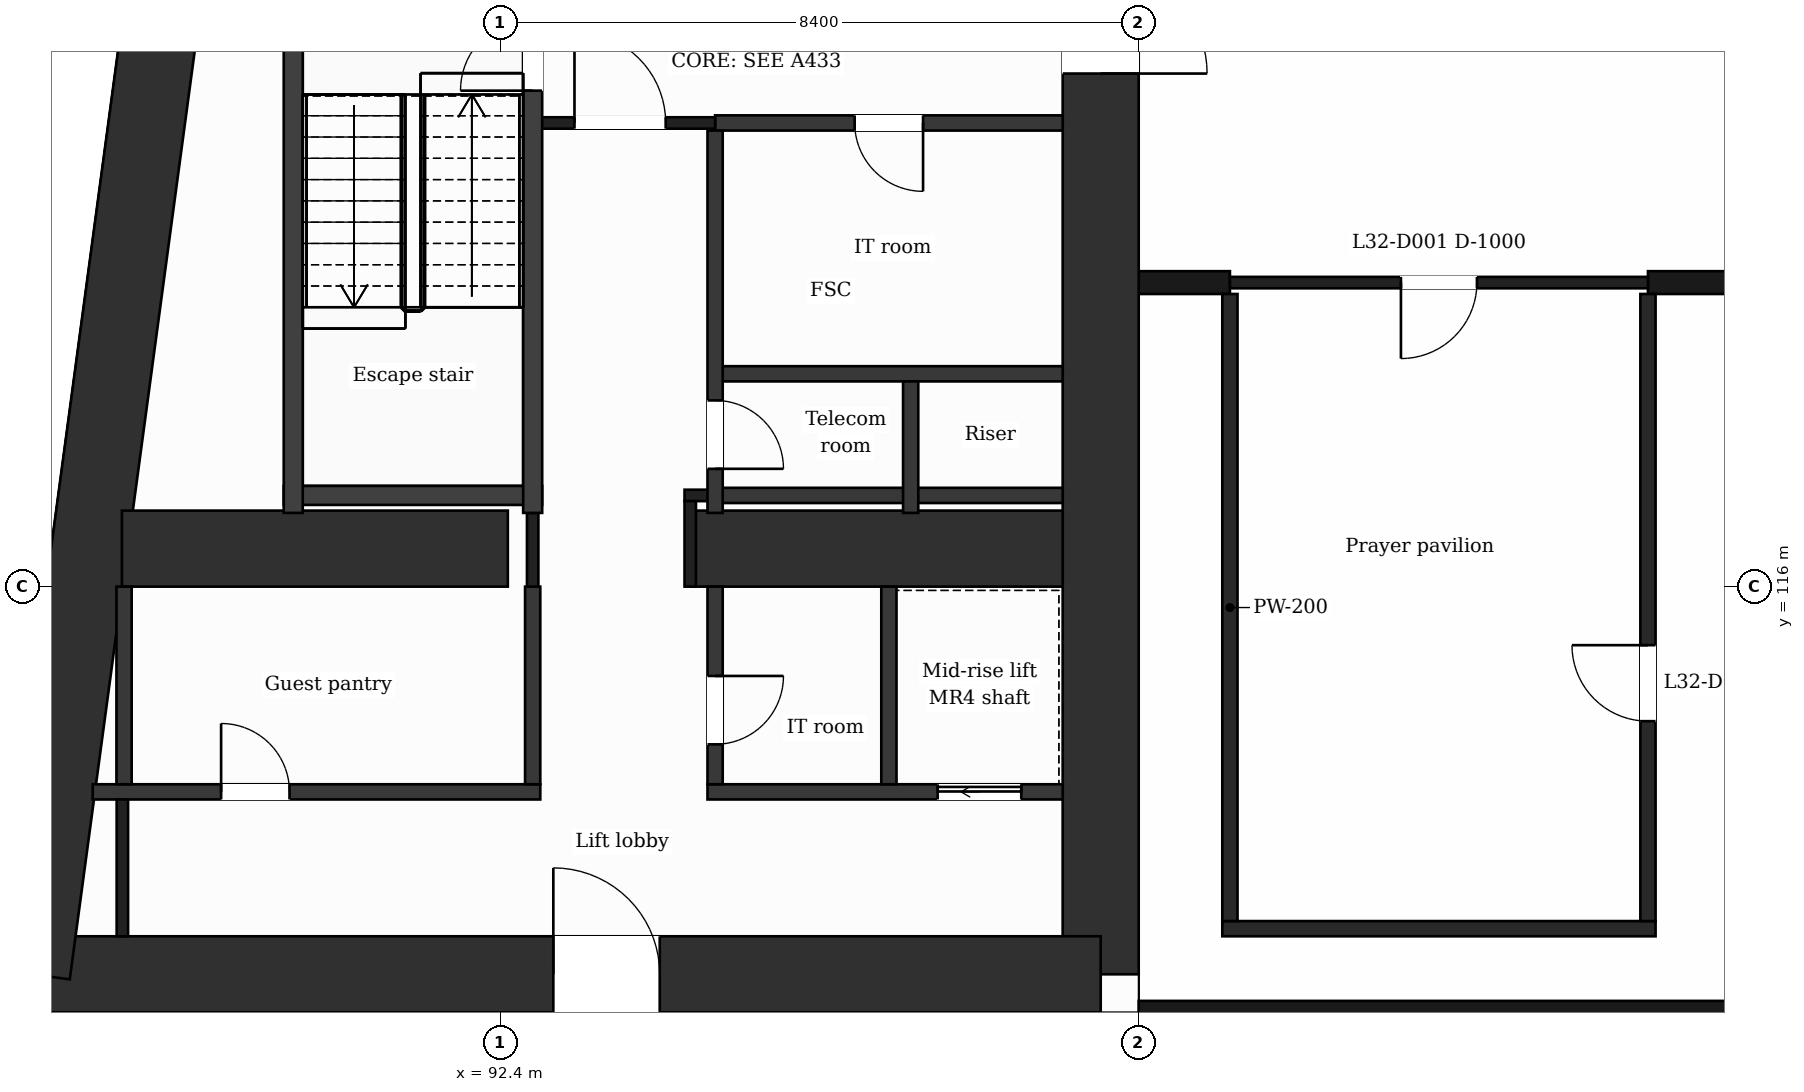
"""IFC4 building model, lengths in metres.
Left out: names, types, materials, properties, quantities, classifications, styles, units other than length and angle.
Written with IfcOpenShell. Run it as: python <this file> out.ifc"""

import sys

from ifc_helpers import new_model, si_unit, direction, frame, frame_2d, origin, place, context, subcontext, project, spatial, rectangle, extrude, element, fill, save


model = new_model("IFC4")
c1 = context("Model", 3, precision=1e-05, world=origin(), true_north=direction((0.0, 1.0)))
c2 = subcontext(c1, "Body", "Model", "MODEL_VIEW")
j1 = project(units=[si_unit("LENGTHUNIT", "METRE"), si_unit("PLANEANGLEUNIT", "RADIAN")], contexts=[c1])
p1 = place(None, origin())
s1 = spatial("IfcSite", under=j1, at=p1, CompositionType="ELEMENT")
p2 = place(p1, origin())
s2 = spatial("IfcBuilding", under=s1, at=p2, CompositionType="ELEMENT")
p3 = place(p2, frame((0.0, 0.0, 135.4)))
s3 = spatial("IfcBuildingStorey", under=s2, at=p3, CompositionType="ELEMENT", Elevation=135.4)
p4 = place(p3, frame((100.3, 131.9, 0.0), z_axis=(0.0, 0.0, 1.0), x_axis=(0.0, -1.0, 0.0)))
e1 = element("IfcWall", 1, at=p4, inside=s3, PredefinedType="SHEAR", context=c2, shape_type="SweptSolid", body=[
    extrude(rectangle(XDim=21.0, YDim=1.0, at=frame_2d((10.5, 0.0))), origin(), (0.0, 0.0, 1.0), 7.4),
])
p5 = place(p4, frame((7.75, 0.0, 0.0)))
e2 = element("IfcOpeningElement", 2, at=p5, cuts=e1, PredefinedType="OPENING", context=c2, shape_type="SweptSolid", body=[
    extrude(rectangle(XDim=1.4, YDim=2.1, at=frame_2d((0.7, 1.05))), frame((0.0, 0.51, 0.0), z_axis=(0.0, -1.0, 0.0), x_axis=(1.0, 0.0, 0.0)), (0.0, 0.0, 1.0), 1.02),
])
p6 = place(p3, frame((100.3, 110.9, 0.0), z_axis=(0.0, 0.0, 1.0), x_axis=(-1.0, 0.0, 0.0)))
e3 = element("IfcWall", 3, at=p6, inside=s3, PredefinedType="SHEAR", context=c2, shape_type="SweptSolid", body=[
    extrude(rectangle(XDim=14.059, YDim=1.0, at=frame_2d((7.03, 0.0))), origin(), (0.0, 0.0, 1.0), 7.4),
])
p7 = place(p6, frame((5.802, 0.0, 0.0)))
e4 = element("IfcOpeningElement", 4, at=p7, cuts=e3, PredefinedType="OPENING", context=c2, shape_type="SweptSolid", body=[
    extrude(rectangle(XDim=1.4, YDim=2.1, at=frame_2d((0.7, 1.05))), frame((0.0, 0.51, 0.0), z_axis=(0.0, -1.0, 0.0), x_axis=(1.0, 0.0, 0.0)), (0.0, 0.0, 1.0), 1.02),
])
p8 = place(p3, frame((86.241, 110.9, 0.0), z_axis=(0.0, 0.0, 1.0), x_axis=(0.133411141623, 0.991060778808, 0.0)))
e5 = element("IfcWall", 5, at=p8, inside=s3, PredefinedType="SHEAR", context=c2, shape_type="SweptSolid", body=[
    extrude(rectangle(XDim=21.189, YDim=1.0, at=frame_2d((10.595, 0.0))), origin(), (0.0, 0.0, 1.0), 7.4),
])
p9 = place(p3, frame((87.423, 116.5, 0.0), z_axis=(0.0, 0.0, 1.0), x_axis=(1.0, 0.0, 0.0)))
e6 = element("IfcWall", 6, at=p9, inside=s3, PredefinedType="SHEAR", context=c2, shape_type="SweptSolid", body=[
    extrude(rectangle(XDim=5.077, YDim=1.0, at=frame_2d((2.539, 0.0))), origin(), (0.0, 0.0, 1.0), 7.4),
])
p10 = place(p3, frame((94.9, 116.5, 0.0), z_axis=(0.0, 0.0, 1.0), x_axis=(1.0, 0.0, 0.0)))
e7 = element("IfcWall", 7, at=p10, inside=s3, PredefinedType="SHEAR", context=c2, shape_type="SweptSolid", body=[
    extrude(rectangle(XDim=4.9, YDim=1.0, at=frame_2d((2.45, 0.0))), origin(), (0.0, 0.0, 1.0), 7.4),
])
p11 = place(p3, frame((100.8, 110.4, 0.0), z_axis=(0.0, 0.0, 1.0), x_axis=(1.0, 0.0, 0.0)))
e8 = element("IfcWall", 8, at=p11, inside=s3, PredefinedType="PARTITIONING", context=c2, shape_type="SweptSolid", body=[
    extrude(rectangle(XDim=25.2, YDim=0.3, at=frame_2d((12.6, 0.0))), origin(), (0.0, 0.0, 1.0), 1.0),
])
p12 = place(p3, frame((101.9, 111.5, 0.0), z_axis=(0.0, 0.0, 1.0), x_axis=(1.0, 0.0, 0.0)))
e9 = element("IfcWall", 9, at=p12, inside=s3, PredefinedType="PARTITIONING", context=c2, shape_type="SweptSolid", body=[
    extrude(rectangle(XDim=5.7, YDim=0.2, at=frame_2d((2.85, 0.0))), origin(), (0.0, 0.0, 1.0), 6.9),
])
p13 = place(p3, frame((87.039, 113.3, 0.0), z_axis=(0.0, 0.0, 1.0), x_axis=(1.0, 0.0, 0.0)))
e10 = element("IfcWall", 10, at=p13, inside=s3, PredefinedType="PARTITIONING", context=c2, shape_type="SweptSolid", body=[
    extrude(rectangle(XDim=5.888, YDim=0.2, at=frame_2d((2.944, 0.0))), origin(), (0.0, 0.0, 1.0), 6.9),
])
p14 = place(p13, frame((1.689, 0.0, 0.0)))
e11 = element("IfcOpeningElement", 11, at=p14, cuts=e10, PredefinedType="OPENING", context=c2, shape_type="SweptSolid", body=[
    extrude(rectangle(XDim=0.9, YDim=2.1, at=frame_2d((0.45, 1.05))), frame((0.0, 0.11, 0.0), z_axis=(0.0, -1.0, 0.0), x_axis=(1.0, 0.0, 0.0)), (0.0, 0.0, 1.0), 0.22),
])
p15 = place(p3, frame((95.127, 113.3, 0.0), z_axis=(0.0, 0.0, 1.0), x_axis=(1.0, 0.0, 0.0)))
e12 = element("IfcWall", 12, at=p15, inside=s3, PredefinedType="PARTITIONING", context=c2, shape_type="SweptSolid", body=[
    extrude(rectangle(XDim=4.673, YDim=0.2, at=frame_2d((2.336, 0.0))), origin(), (0.0, 0.0, 1.0), 6.9),
])
p16 = place(p15, frame((3.028, 0.0, 0.0)))
e13 = element("IfcOpeningElement", 13, at=p16, cuts=e12, PredefinedType="OPENING", context=c2, shape_type="SweptSolid", body=[
    extrude(rectangle(XDim=1.1, YDim=2.1, at=frame_2d((0.55, 1.05))), frame((0.0, 0.11, 0.0), z_axis=(0.0, -1.0, 0.0), x_axis=(1.0, 0.0, 0.0)), (0.0, 0.0, 1.0), 0.22),
])
p17 = place(p3, frame((95.227, 117.2, 0.0), z_axis=(0.0, 0.0, 1.0), x_axis=(1.0, 0.0, 0.0)))
e14 = element("IfcWall", 14, at=p17, inside=s3, PredefinedType="PARTITIONING", context=c2, shape_type="SweptSolid", body=[
    extrude(rectangle(XDim=4.573, YDim=0.2, at=frame_2d((2.287, 0.0))), origin(), (0.0, 0.0, 1.0), 6.9),
])
p18 = place(p3, frame((94.825, 117.2, 0.0), z_axis=(0.0, 0.0, 1.0), x_axis=(1.0, 0.0, 0.0)))
e15 = element("IfcWall", 15, at=p18, inside=s3, PredefinedType="PARTITIONING", context=c2, shape_type="SweptSolid", body=[
    extrude(rectangle(XDim=0.402, YDim=0.15, at=frame_2d((0.201, 0.0))), origin(), (0.0, 0.0, 1.0), 6.9),
])
p19 = place(p3, frame((89.552, 117.2, 0.0), z_axis=(0.0, 0.0, 1.0), x_axis=(1.0, 0.0, 0.0)))
e16 = element("IfcWall", 16, at=p19, inside=s3, PredefinedType="PARTITIONING", context=c2, shape_type="SweptSolid", body=[
    extrude(rectangle(XDim=3.4, YDim=0.25, at=frame_2d((1.7, 0.0))), origin(), (0.0, 0.0, 1.0), 6.9),
])
p20 = place(p3, frame((95.227, 118.8, 0.0), z_axis=(0.0, 0.0, 1.0), x_axis=(1.0, 0.0, 0.0)))
e17 = element("IfcWall", 17, at=p20, inside=s3, PredefinedType="PARTITIONING", context=c2, shape_type="SweptSolid", body=[
    extrude(rectangle(XDim=4.573, YDim=0.2, at=frame_2d((2.287, 0.0))), origin(), (0.0, 0.0, 1.0), 6.9),
])
p21 = place(p3, frame((100.8, 120.0, 0.0), z_axis=(0.0, 0.0, 1.0), x_axis=(1.0, 0.0, 0.0)))
e18 = element("IfcWall", 18, at=p21, inside=s3, PredefinedType="PARTITIONING", context=c2, shape_type="SweptSolid", body=[
    extrude(rectangle(XDim=1.2, YDim=0.3, at=frame_2d((0.6, 0.0))), origin(), (0.0, 0.0, 1.0), 1.0),
])
p22 = place(p3, frame((107.5, 120.0, 0.0), z_axis=(0.0, 0.0, 1.0), x_axis=(1.0, 0.0, 0.0)))
e19 = element("IfcWall", 19, at=p22, inside=s3, PredefinedType="PARTITIONING", context=c2, shape_type="SweptSolid", body=[
    extrude(rectangle(XDim=3.4, YDim=0.3, at=frame_2d((1.7, 0.0))), origin(), (0.0, 0.0, 1.0), 1.0),
])
p23 = place(p3, frame((102.0, 120.0, 0.0), z_axis=(0.0, 0.0, 1.0), x_axis=(1.0, 0.0, 0.0)))
e20 = element("IfcWall", 20, at=p23, inside=s3, PredefinedType="PARTITIONING", context=c2, shape_type="SweptSolid", body=[
    extrude(rectangle(XDim=5.5, YDim=0.15, at=frame_2d((2.75, 0.0))), origin(), (0.0, 0.0, 1.0), 6.9),
])
p24 = place(p23, frame((2.25, 0.0, 0.0)))
e21 = element("IfcOpeningElement", 21, at=p24, cuts=e20, PredefinedType="OPENING", context=c2, shape_type="SweptSolid", body=[
    extrude(rectangle(XDim=1.0, YDim=2.1, at=frame_2d((0.5, 1.05))), frame((0.0, 0.085, 0.0), z_axis=(0.0, -1.0, 0.0), x_axis=(1.0, 0.0, 0.0)), (0.0, 0.0, 1.0), 0.17),
])
p25 = place(p3, frame((95.227, 122.1, 0.0), z_axis=(0.0, 0.0, 1.0), x_axis=(1.0, 0.0, 0.0)))
e22 = element("IfcWall", 22, at=p25, inside=s3, PredefinedType="PARTITIONING", context=c2, shape_type="SweptSolid", body=[
    extrude(rectangle(XDim=4.573, YDim=0.2, at=frame_2d((2.287, 0.0))), origin(), (0.0, 0.0, 1.0), 6.9),
])
p26 = place(p25, frame((1.836, 0.0, 0.0)))
e23 = element("IfcOpeningElement", 23, at=p26, cuts=e22, PredefinedType="OPENING", context=c2, shape_type="SweptSolid", body=[
    extrude(rectangle(XDim=0.9, YDim=2.1, at=frame_2d((0.45, 1.05))), frame((0.0, 0.11, 0.0), z_axis=(0.0, -1.0, 0.0), x_axis=(1.0, 0.0, 0.0)), (0.0, 0.0, 1.0), 0.22),
])
p27 = place(p3, frame((92.827, 122.1, 0.0), z_axis=(0.0, 0.0, 1.0), x_axis=(1.0, 0.0, 0.0)))
e24 = element("IfcWall", 24, at=p27, inside=s3, PredefinedType="PARTITIONING", context=c2, shape_type="SweptSolid", body=[
    extrude(rectangle(XDim=2.4, YDim=0.15, at=frame_2d((1.2, 0.0))), origin(), (0.0, 0.0, 1.0), 6.9),
])
p28 = place(p27, frame((0.55, 0.0, 0.0)))
e25 = element("IfcOpeningElement", 25, at=p28, cuts=e24, PredefinedType="OPENING", context=c2, shape_type="SweptSolid", body=[
    extrude(rectangle(XDim=1.2, YDim=2.1, at=frame_2d((0.6, 1.05))), frame((0.0, 0.085, 0.0), z_axis=(0.0, -1.0, 0.0), x_axis=(1.0, 0.0, 0.0)), (0.0, 0.0, 1.0), 0.17),
])
p29 = place(p3, frame((87.451, 113.4, 0.0), z_axis=(0.0, 0.0, 1.0), x_axis=(0.0, 1.0, 0.0)))
e26 = element("IfcWall", 26, at=p29, inside=s3, PredefinedType="PARTITIONING", context=c2, shape_type="SweptSolid", body=[
    extrude(rectangle(XDim=2.6, YDim=0.2, at=frame_2d((1.3, 0.0))), origin(), (0.0, 0.0, 1.0), 6.9),
])
p30 = place(p3, frame((87.429, 111.4, 0.0), z_axis=(0.0, 0.0, 1.0), x_axis=(0.0, 1.0, 0.0)))
e27 = element("IfcWall", 27, at=p30, inside=s3, PredefinedType="PARTITIONING", context=c2, shape_type="SweptSolid", body=[
    extrude(rectangle(XDim=1.8, YDim=0.15, at=frame_2d((0.9, 0.0))), origin(), (0.0, 0.0, 1.0), 6.9),
])
p31 = place(p3, frame((89.677, 116.97, 0.0), z_axis=(0.0, 0.0, 1.0), x_axis=(0.0, 1.0, 0.0)))
e28 = element("IfcWall", 28, at=p31, inside=s3, PredefinedType="PARTITIONING", context=c2, shape_type="SweptSolid", body=[
    extrude(rectangle(XDim=6.855, YDim=0.25, at=frame_2d((3.427, 0.0))), origin(), (0.0, 0.0, 1.0), 6.9),
])
p32 = place(p3, frame((92.827, 113.4, 0.0), z_axis=(0.0, 0.0, 1.0), x_axis=(0.0, 1.0, 0.0)))
e29 = element("IfcWall", 29, at=p32, inside=s3, PredefinedType="PARTITIONING", context=c2, shape_type="SweptSolid", body=[
    extrude(rectangle(XDim=2.6, YDim=0.2, at=frame_2d((1.3, 0.0))), origin(), (0.0, 0.0, 1.0), 6.9),
])
p33 = place(p3, frame((92.827, 116.0, 0.0), z_axis=(0.0, 0.0, 1.0), x_axis=(0.0, 1.0, 0.0)))
e30 = element("IfcWall", 30, at=p33, inside=s3, PredefinedType="PARTITIONING", context=c2, shape_type="SweptSolid", body=[
    extrude(rectangle(XDim=0.97, YDim=0.15, at=frame_2d((0.485, 0.0))), origin(), (0.0, 0.0, 1.0), 6.9),
])
p34 = place(p3, frame((92.827, 116.97, 0.0), z_axis=(0.0, 0.0, 1.0), x_axis=(0.0, 1.0, 0.0)))
e31 = element("IfcWall", 31, at=p34, inside=s3, PredefinedType="PARTITIONING", context=c2, shape_type="SweptSolid", body=[
    extrude(rectangle(XDim=6.855, YDim=0.25, at=frame_2d((3.427, 0.0))), origin(), (0.0, 0.0, 1.0), 6.9),
])
p35 = place(p34, frame((5.555, 0.0, 0.0)))
e32 = element("IfcOpeningElement", 32, at=p35, cuts=e31, PredefinedType="OPENING", context=c2, shape_type="SweptSolid", body=[
    extrude(rectangle(XDim=0.95, YDim=2.1, at=frame_2d((0.475, 1.05))), frame((0.0, 0.135, 0.0), z_axis=(0.0, -1.0, 0.0), x_axis=(1.0, 0.0, 0.0)), (0.0, 0.0, 1.0), 0.27),
])
p36 = place(p3, frame((94.9, 116.0, 0.0), z_axis=(0.0, 0.0, 1.0), x_axis=(0.0, 1.0, 0.0)))
e33 = element("IfcWall", 33, at=p36, inside=s3, PredefinedType="PARTITIONING", context=c2, shape_type="SweptSolid", body=[
    extrude(rectangle(XDim=1.125, YDim=0.15, at=frame_2d((0.562, 0.0))), origin(), (0.0, 0.0, 1.0), 6.9),
])
p37 = place(p3, frame((95.227, 113.4, 0.0), z_axis=(0.0, 0.0, 1.0), x_axis=(0.0, 1.0, 0.0)))
e34 = element("IfcWall", 34, at=p37, inside=s3, PredefinedType="PARTITIONING", context=c2, shape_type="SweptSolid", body=[
    extrude(rectangle(XDim=2.6, YDim=0.2, at=frame_2d((1.3, 0.0))), origin(), (0.0, 0.0, 1.0), 6.9),
])
p38 = place(p37, frame((0.525, 0.0, 0.0)))
e35 = element("IfcOpeningElement", 35, at=p38, cuts=e34, PredefinedType="OPENING", context=c2, shape_type="SweptSolid", body=[
    extrude(rectangle(XDim=0.9, YDim=2.1, at=frame_2d((0.45, 1.05))), frame((0.0, 0.11, 0.0), z_axis=(0.0, -1.0, 0.0), x_axis=(1.0, 0.0, 0.0)), (0.0, 0.0, 1.0), 0.22),
])
p39 = place(p3, frame((95.227, 116.97, 0.0), z_axis=(0.0, 0.0, 1.0), x_axis=(0.0, 1.0, 0.0)))
e36 = element("IfcWall", 36, at=p39, inside=s3, PredefinedType="PARTITIONING", context=c2, shape_type="SweptSolid", body=[
    extrude(rectangle(XDim=5.03, YDim=0.2, at=frame_2d((2.515, 0.0))), origin(), (0.0, 0.0, 1.0), 6.9),
])
p40 = place(p39, frame((0.58, 0.0, 0.0)))
e37 = element("IfcOpeningElement", 37, at=p40, cuts=e36, PredefinedType="OPENING", context=c2, shape_type="SweptSolid", body=[
    extrude(rectangle(XDim=0.9, YDim=2.1, at=frame_2d((0.45, 1.05))), frame((0.0, 0.11, 0.0), z_axis=(0.0, -1.0, 0.0), x_axis=(1.0, 0.0, 0.0)), (0.0, 0.0, 1.0), 0.22),
])
p41 = place(p3, frame((97.513, 113.4, 0.0), z_axis=(0.0, 0.0, 1.0), x_axis=(0.0, 1.0, 0.0)))
e38 = element("IfcWall", 38, at=p41, inside=s3, PredefinedType="PARTITIONING", context=c2, shape_type="SweptSolid", body=[
    extrude(rectangle(XDim=2.6, YDim=0.2, at=frame_2d((1.3, 0.0))), origin(), (0.0, 0.0, 1.0), 6.9),
])
p42 = place(p3, frame((97.8, 116.97, 0.0), z_axis=(0.0, 0.0, 1.0), x_axis=(0.0, 1.0, 0.0)))
e39 = element("IfcWall", 39, at=p42, inside=s3, PredefinedType="PARTITIONING", context=c2, shape_type="SweptSolid", body=[
    extrude(rectangle(XDim=1.73, YDim=0.2, at=frame_2d((0.865, 0.0))), origin(), (0.0, 0.0, 1.0), 6.9),
])
p43 = place(p3, frame((102.0, 111.6, 0.0), z_axis=(0.0, 0.0, 1.0), x_axis=(0.0, 1.0, 0.0)))
e40 = element("IfcWall", 40, at=p43, inside=s3, PredefinedType="PARTITIONING", context=c2, shape_type="SweptSolid", body=[
    extrude(rectangle(XDim=8.25, YDim=0.2, at=frame_2d((4.125, 0.0))), origin(), (0.0, 0.0, 1.0), 6.9),
])
p44 = place(p3, frame((107.5, 111.6, 0.0), z_axis=(0.0, 0.0, 1.0), x_axis=(0.0, 1.0, 0.0)))
e41 = element("IfcWall", 41, at=p44, inside=s3, PredefinedType="PARTITIONING", context=c2, shape_type="SweptSolid", body=[
    extrude(rectangle(XDim=8.25, YDim=0.2, at=frame_2d((4.125, 0.0))), origin(), (0.0, 0.0, 1.0), 6.9),
])
p45 = place(p44, frame((2.63, 0.0, 0.0)))
e42 = element("IfcOpeningElement", 42, at=p45, cuts=e41, PredefinedType="OPENING", context=c2, shape_type="SweptSolid", body=[
    extrude(rectangle(XDim=1.0, YDim=2.1, at=frame_2d((0.5, 1.05))), frame((0.0, 0.11, 0.0), z_axis=(0.0, -1.0, 0.0), x_axis=(1.0, 0.0, 0.0)), (0.0, 0.0, 1.0), 0.22),
])
p46 = place(p24, origin())
e43 = element("IfcDoor", 43, at=p46, inside=s3, OperationType="SINGLE_SWING_LEFT", PredefinedType="DOOR", context=c2, shape_type="SweptSolid", body=[
    extrude(rectangle(XDim=1.0, YDim=2.1, at=frame_2d((0.5, 1.05))), frame((0.0, 0.025, 0.0), z_axis=(0.0, -1.0, 0.0), x_axis=(1.0, 0.0, 0.0)), (0.0, 0.0, 1.0), 0.05),
])
fill(e21, e43)
p47 = place(p45, origin())
e44 = element("IfcDoor", 44, at=p47, inside=s3, OperationType="SINGLE_SWING_RIGHT", PredefinedType="DOOR", context=c2, shape_type="SweptSolid", body=[
    extrude(rectangle(XDim=1.0, YDim=2.1, at=frame_2d((0.5, 1.05))), frame((0.0, 0.025, 0.0), z_axis=(0.0, -1.0, 0.0), x_axis=(1.0, 0.0, 0.0)), (0.0, 0.0, 1.0), 0.05),
])
fill(e42, e44)
p48 = place(p28, origin())
e45 = element("IfcDoor", 45, at=p48, inside=s3, OperationType="SINGLE_SWING_LEFT", PredefinedType="DOOR", context=c2, shape_type="SweptSolid", body=[
    extrude(rectangle(XDim=1.2, YDim=2.1, at=frame_2d((0.6, 1.05))), frame((0.0, 0.025, 0.0), z_axis=(0.0, -1.0, 0.0), x_axis=(1.0, 0.0, 0.0)), (0.0, 0.0, 1.0), 0.05),
])
fill(e25, e45)
p49 = place(p26, origin())
e46 = element("IfcDoor", 46, at=p49, inside=s3, OperationType="SINGLE_SWING_RIGHT", PredefinedType="DOOR", context=c2, shape_type="SweptSolid", body=[
    extrude(rectangle(XDim=0.9, YDim=2.1, at=frame_2d((0.45, 1.05))), frame((0.0, 0.025, 0.0), z_axis=(0.0, -1.0, 0.0), x_axis=(1.0, 0.0, 0.0)), (0.0, 0.0, 1.0), 0.05),
])
fill(e23, e46)
p50 = place(p35, origin())
e47 = element("IfcDoor", 47, at=p50, inside=s3, OperationType="SINGLE_SWING_LEFT", PredefinedType="DOOR", context=c2, shape_type="SweptSolid", body=[
    extrude(rectangle(XDim=0.95, YDim=2.1, at=frame_2d((0.475, 1.05))), frame((0.0, 0.025, 0.0), z_axis=(0.0, -1.0, 0.0), x_axis=(1.0, 0.0, 0.0)), (0.0, 0.0, 1.0), 0.05),
])
fill(e32, e47)
p51 = place(p40, origin())
e48 = element("IfcDoor", 48, at=p51, inside=s3, OperationType="SINGLE_SWING_LEFT", PredefinedType="DOOR", context=c2, shape_type="SweptSolid", body=[
    extrude(rectangle(XDim=0.9, YDim=2.1, at=frame_2d((0.45, 1.05))), frame((0.0, 0.025, 0.0), z_axis=(0.0, -1.0, 0.0), x_axis=(1.0, 0.0, 0.0)), (0.0, 0.0, 1.0), 0.05),
])
fill(e37, e48)
p52 = place(p16, origin())
e49 = element("IfcDoor", 49, at=p52, inside=s3, OperationType="SLIDING_TO_LEFT", PredefinedType="DOOR", context=c2, shape_type="SweptSolid", body=[
    extrude(rectangle(XDim=1.1, YDim=2.1, at=frame_2d((0.55, 1.05))), frame((0.0, 0.025, 0.0), z_axis=(0.0, -1.0, 0.0), x_axis=(1.0, 0.0, 0.0)), (0.0, 0.0, 1.0), 0.05),
])
fill(e13, e49)
p53 = place(p14, origin())
e50 = element("IfcDoor", 50, at=p53, inside=s3, OperationType="SINGLE_SWING_LEFT", PredefinedType="DOOR", context=c2, shape_type="SweptSolid", body=[
    extrude(rectangle(XDim=0.9, YDim=2.1, at=frame_2d((0.45, 1.05))), frame((0.0, 0.025, 0.0), z_axis=(0.0, -1.0, 0.0), x_axis=(1.0, 0.0, 0.0)), (0.0, 0.0, 1.0), 0.05),
])
fill(e11, e50)
p54 = place(p38, origin())
e51 = element("IfcDoor", 51, at=p54, inside=s3, OperationType="SINGLE_SWING_RIGHT", PredefinedType="DOOR", context=c2, shape_type="SweptSolid", body=[
    extrude(rectangle(XDim=0.9, YDim=2.1, at=frame_2d((0.45, 1.05))), frame((0.0, 0.025, 0.0), z_axis=(0.0, -1.0, 0.0), x_axis=(1.0, 0.0, 0.0)), (0.0, 0.0, 1.0), 0.05),
])
fill(e35, e51)
p55 = place(p7, origin())
e52 = element("IfcDoor", 52, at=p55, inside=s3, OperationType="SINGLE_SWING_RIGHT", PredefinedType="DOOR", context=c2, shape_type="SweptSolid", body=[
    extrude(rectangle(XDim=1.4, YDim=2.1, at=frame_2d((0.7, 1.05))), frame((0.0, 0.025, 0.0), z_axis=(0.0, -1.0, 0.0), x_axis=(1.0, 0.0, 0.0)), (0.0, 0.0, 1.0), 0.05),
])
fill(e4, e52)
p56 = place(p5, origin())
e53 = element("IfcDoor", 53, at=p56, inside=s3, OperationType="SINGLE_SWING_RIGHT", PredefinedType="DOOR", context=c2, shape_type="SweptSolid", body=[
    extrude(rectangle(XDim=1.4, YDim=2.1, at=frame_2d((0.7, 1.05))), frame((0.0, 0.025, 0.0), z_axis=(0.0, -1.0, 0.0), x_axis=(1.0, 0.0, 0.0)), (0.0, 0.0, 1.0), 0.05),
])
fill(e2, e53)
save(model, sys.argv[1])
